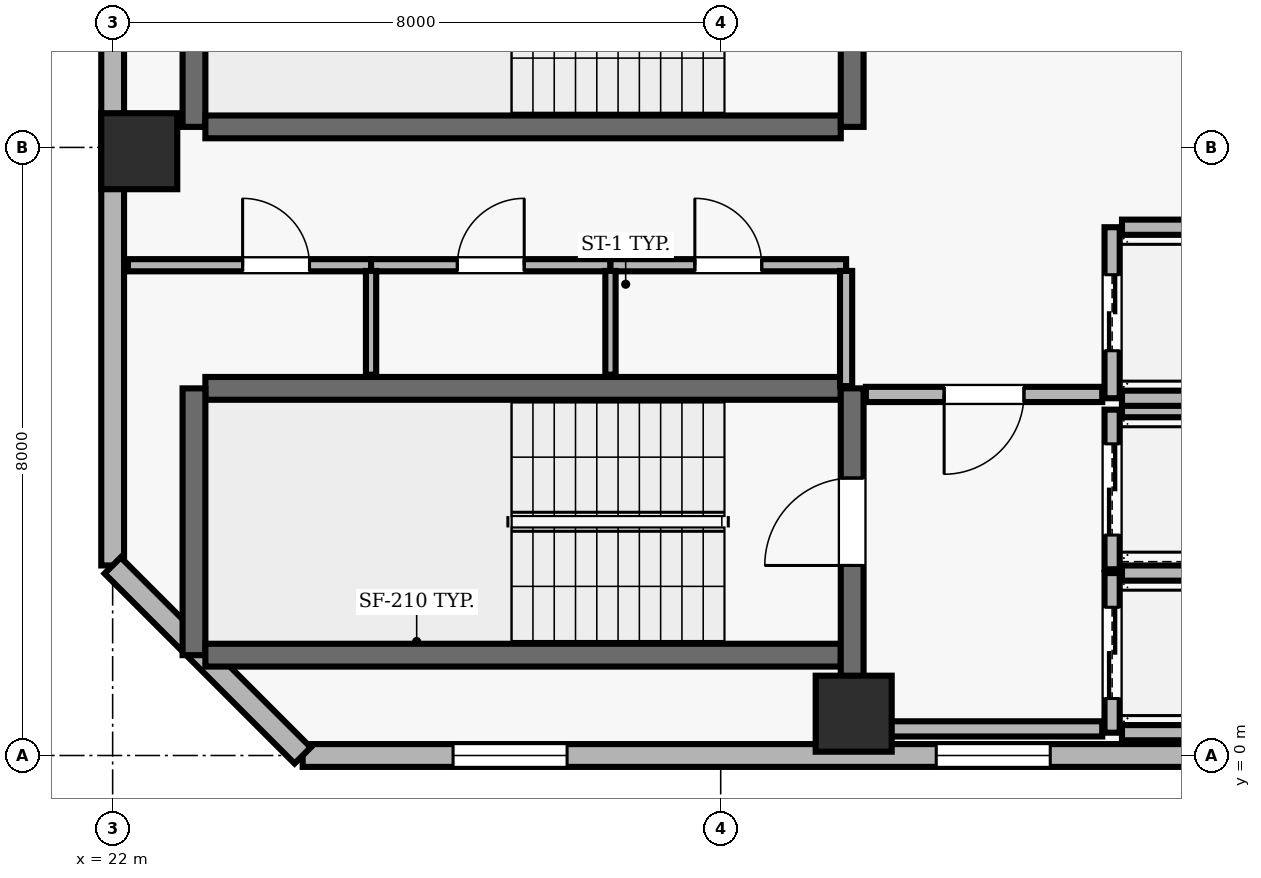
"""IFC4 building model, lengths in metres.
Left out: names, types, materials, properties, quantities, classifications, styles, units other than length and angle.
Written with IfcOpenShell. Run it as: python <this file> out.ifc"""

import sys

from ifc_helpers import new_model, si_unit, direction, frame, frame_2d, origin, origin_2d, place, context, subcontext, project, spatial, rectangle, extrude, element, fill, save


model = new_model("IFC4")
c1 = context("Model", 3, precision=1e-05, world=origin(), true_north=direction((0.0, 1.0)))
c2 = subcontext(c1, "Body", "Model", "MODEL_VIEW")
j1 = project(units=[si_unit("LENGTHUNIT", "METRE"), si_unit("PLANEANGLEUNIT", "RADIAN")], contexts=[c1])
p1 = place(None, origin())
s1 = spatial("IfcSite", under=j1, at=p1, CompositionType="ELEMENT")
p2 = place(p1, origin())
s2 = spatial("IfcBuilding", under=s1, at=p2, CompositionType="ELEMENT")
p3 = place(p2, frame((0.0, 0.0, 218.7)))
s3 = spatial("IfcBuildingStorey", under=s2, at=p3, CompositionType="ELEMENT", Elevation=218.7)
for number, where, z_axis, x_axis in (
    (1, (31.75, 0.55, 0.0), (0.0, 0.0, 1.0), (1.0, 0.0, 0.0)),
    (2, (22.35, 7.95, 0.0), (0.0, 0.0, 1.0), (1.0, 0.0, 0.0)),
):
    element("IfcColumn", number, at=place(p3, frame(where, z_axis=z_axis, x_axis=x_axis)), inside=s3, PredefinedType="COLUMN", context=c2, shape_type="SweptSolid", body=[
        extrude(rectangle(XDim=1.0, YDim=1.0, at=origin_2d()), origin(), (0.0, 0.0, 1.0), 3.9),
    ])
p4 = place(p3, frame((24.5, 0.0, 0.0), z_axis=(0.0, 0.0, 1.0), x_axis=(1.0, 0.0, 0.0)))
e3 = element("IfcWall", 3, at=p4, inside=s3, PredefinedType="SOLIDWALL", context=c2, shape_type="SweptSolid", body=[
    extrude(rectangle(XDim=38.2, YDim=0.3, at=frame_2d((19.1, 0.0))), origin(), (0.0, 0.0, 1.0), 3.69),
])
p5 = place(p4, frame((1.979, 0.0, 0.9)))
e4 = element("IfcOpeningElement", 4, at=p5, cuts=e3, PredefinedType="OPENING", context=c2, shape_type="SweptSolid", body=[
    extrude(rectangle(XDim=1.5, YDim=1.8, at=frame_2d((0.75, 0.9))), frame((0.0, 0.16, 0.0), z_axis=(0.0, -1.0, 0.0), x_axis=(1.0, 0.0, 0.0)), (0.0, 0.0, 1.0), 0.32),
])
p6 = place(p4, frame((8.336, 0.0, 0.9)))
e5 = element("IfcOpeningElement", 5, at=p6, cuts=e3, PredefinedType="OPENING", context=c2, shape_type="SweptSolid", body=[
    extrude(rectangle(XDim=1.5, YDim=1.8, at=frame_2d((0.75, 0.9))), frame((0.0, 0.16, 0.0), z_axis=(0.0, -1.0, 0.0), x_axis=(1.0, 0.0, 0.0)), (0.0, 0.0, 1.0), 0.32),
])
p7 = place(p4, frame((18.35, 0.0, 0.9)))
e6 = element("IfcOpeningElement", 6, at=p7, cuts=e3, PredefinedType="OPENING", context=c2, shape_type="SweptSolid", body=[
    extrude(rectangle(XDim=1.5, YDim=1.8, at=frame_2d((0.75, 0.9))), frame((0.0, 0.16, 0.0), z_axis=(0.0, -1.0, 0.0), x_axis=(1.0, 0.0, 0.0)), (0.0, 0.0, 1.0), 0.32),
])
p8 = place(p4, frame((29.264, 0.0, 0.9)))
e7 = element("IfcOpeningElement", 7, at=p8, cuts=e3, PredefinedType="OPENING", context=c2, shape_type="SweptSolid", body=[
    extrude(rectangle(XDim=1.5, YDim=1.8, at=frame_2d((0.75, 0.9))), frame((0.0, 0.16, 0.0), z_axis=(0.0, -1.0, 0.0), x_axis=(1.0, 0.0, 0.0)), (0.0, 0.0, 1.0), 0.32),
])
p9 = place(p4, frame((34.721, 0.0, 0.9)))
e8 = element("IfcOpeningElement", 8, at=p9, cuts=e3, PredefinedType="OPENING", context=c2, shape_type="SweptSolid", body=[
    extrude(rectangle(XDim=1.5, YDim=1.8, at=frame_2d((0.75, 0.9))), frame((0.0, 0.16, 0.0), z_axis=(0.0, -1.0, 0.0), x_axis=(1.0, 0.0, 0.0)), (0.0, 0.0, 1.0), 0.32),
])
p10 = place(p3, frame((22.0, 40.7, 0.0), z_axis=(0.0, 0.0, 1.0), x_axis=(0.0, -1.0, 0.0)))
e9 = element("IfcWall", 9, at=p10, inside=s3, PredefinedType="SOLIDWALL", context=c2, shape_type="SweptSolid", body=[
    extrude(rectangle(XDim=38.2, YDim=0.3, at=frame_2d((19.1, 0.0))), origin(), (0.0, 0.0, 1.0), 3.69),
])
p11 = place(p10, frame((7.8, 0.0, 0.0)))
e10 = element("IfcOpeningElement", 10, at=p11, cuts=e9, PredefinedType="OPENING", context=c2, shape_type="SweptSolid", body=[
    extrude(rectangle(XDim=1.0, YDim=2.2, at=frame_2d((0.5, 1.1))), frame((0.0, 0.16, 0.0), z_axis=(0.0, -1.0, 0.0), x_axis=(1.0, 0.0, 0.0)), (0.0, 0.0, 1.0), 0.32),
])
p12 = place(p10, frame((1.979, 0.0, 0.9)))
e11 = element("IfcOpeningElement", 11, at=p12, cuts=e9, PredefinedType="OPENING", context=c2, shape_type="SweptSolid", body=[
    extrude(rectangle(XDim=1.5, YDim=1.8, at=frame_2d((0.75, 0.9))), frame((0.0, 0.16, 0.0), z_axis=(0.0, -1.0, 0.0), x_axis=(1.0, 0.0, 0.0)), (0.0, 0.0, 1.0), 0.32),
])
p13 = place(p10, frame((12.443, 0.0, 0.9)))
e12 = element("IfcOpeningElement", 12, at=p13, cuts=e9, PredefinedType="OPENING", context=c2, shape_type="SweptSolid", body=[
    extrude(rectangle(XDim=1.5, YDim=1.8, at=frame_2d((0.75, 0.9))), frame((0.0, 0.16, 0.0), z_axis=(0.0, -1.0, 0.0), x_axis=(1.0, 0.0, 0.0)), (0.0, 0.0, 1.0), 0.32),
])
p14 = place(p10, frame((18.35, 0.0, 0.9)))
e13 = element("IfcOpeningElement", 13, at=p14, cuts=e9, PredefinedType="OPENING", context=c2, shape_type="SweptSolid", body=[
    extrude(rectangle(XDim=1.5, YDim=1.8, at=frame_2d((0.75, 0.9))), frame((0.0, 0.16, 0.0), z_axis=(0.0, -1.0, 0.0), x_axis=(1.0, 0.0, 0.0)), (0.0, 0.0, 1.0), 0.32),
])
p15 = place(p10, frame((23.807, 0.0, 0.9)))
e14 = element("IfcOpeningElement", 14, at=p15, cuts=e9, PredefinedType="OPENING", context=c2, shape_type="SweptSolid", body=[
    extrude(rectangle(XDim=1.5, YDim=1.8, at=frame_2d((0.75, 0.9))), frame((0.0, 0.16, 0.0), z_axis=(0.0, -1.0, 0.0), x_axis=(1.0, 0.0, 0.0)), (0.0, 0.0, 1.0), 0.32),
])
p16 = place(p10, frame((29.264, 0.0, 0.9)))
e15 = element("IfcOpeningElement", 15, at=p16, cuts=e9, PredefinedType="OPENING", context=c2, shape_type="SweptSolid", body=[
    extrude(rectangle(XDim=1.5, YDim=1.8, at=frame_2d((0.75, 0.9))), frame((0.0, 0.16, 0.0), z_axis=(0.0, -1.0, 0.0), x_axis=(1.0, 0.0, 0.0)), (0.0, 0.0, 1.0), 0.32),
])
p17 = place(p3, frame((22.0, 2.5, 0.0), z_axis=(0.0, 0.0, 1.0), x_axis=(0.707106781187, -0.707106781187, 0.0)))
e16 = element("IfcWall", 16, at=p17, inside=s3, PredefinedType="SOLIDWALL", context=c2, shape_type="SweptSolid", body=[
    extrude(rectangle(XDim=3.536, YDim=0.3, at=frame_2d((1.768, 0.0))), origin(), (0.0, 0.0, 1.0), 3.69),
])
p18 = place(p3, frame((31.58, 4.83, 0.0), z_axis=(0.0, 0.0, 1.0), x_axis=(-1.0, 0.0, 0.0)))
e17 = element("IfcWall", 17, at=p18, inside=s3, PredefinedType="SHEAR", context=c2, shape_type="SweptSolid", body=[
    extrude(rectangle(XDim=8.36, YDim=0.3, at=frame_2d((4.18, 0.0))), origin(), (0.0, 0.0, 1.0), 3.69),
])
p19 = place(p3, frame((23.07, 4.83, 0.0), z_axis=(0.0, 0.0, 1.0), x_axis=(0.0, -1.0, 0.0)))
e18 = element("IfcWall", 18, at=p19, inside=s3, PredefinedType="SHEAR", context=c2, shape_type="SweptSolid", body=[
    extrude(rectangle(XDim=3.51, YDim=0.3, at=frame_2d((1.755, 0.0))), origin(), (0.0, 0.0, 1.0), 3.69),
])
p20 = place(p3, frame((23.22, 1.32, 0.0), z_axis=(0.0, 0.0, 1.0), x_axis=(1.0, 0.0, 0.0)))
e19 = element("IfcWall", 19, at=p20, inside=s3, PredefinedType="SHEAR", context=c2, shape_type="SweptSolid", body=[
    extrude(rectangle(XDim=8.36, YDim=0.3, at=frame_2d((4.18, 0.0))), origin(), (0.0, 0.0, 1.0), 3.69),
])
p21 = place(p3, frame((31.73, 0.96, 0.0), z_axis=(0.0, 0.0, 1.0), x_axis=(0.0, 1.0, 0.0)))
e20 = element("IfcWall", 20, at=p21, inside=s3, PredefinedType="SHEAR", context=c2, shape_type="SweptSolid", body=[
    extrude(rectangle(XDim=3.87, YDim=0.3, at=frame_2d((1.935, 0.0))), origin(), (0.0, 0.0, 1.0), 3.69),
])
p22 = place(p21, frame((1.54, 0.0, 0.0)))
e21 = element("IfcOpeningElement", 21, at=p22, cuts=e20, PredefinedType="OPENING", context=c2, shape_type="SweptSolid", body=[
    extrude(rectangle(XDim=1.15, YDim=2.15, at=frame_2d((0.575, 1.075))), frame((0.0, 0.16, 0.0), z_axis=(0.0, -1.0, 0.0), x_axis=(1.0, 0.0, 0.0)), (0.0, 0.0, 1.0), 0.32),
])
p23 = place(p3, frame((23.07, 11.78, 0.0), z_axis=(0.0, 0.0, 1.0), x_axis=(0.0, -1.0, 0.0)))
e22 = element("IfcWall", 22, at=p23, inside=s3, PredefinedType="SHEAR", context=c2, shape_type="SweptSolid", body=[
    extrude(rectangle(XDim=3.51, YDim=0.3, at=frame_2d((1.755, 0.0))), origin(), (0.0, 0.0, 1.0), 3.69),
])
p24 = place(p3, frame((23.22, 8.27, 0.0), z_axis=(0.0, 0.0, 1.0), x_axis=(1.0, 0.0, 0.0)))
e23 = element("IfcWall", 23, at=p24, inside=s3, PredefinedType="SHEAR", context=c2, shape_type="SweptSolid", body=[
    extrude(rectangle(XDim=8.36, YDim=0.3, at=frame_2d((4.18, 0.0))), origin(), (0.0, 0.0, 1.0), 3.69),
])
p25 = place(p3, frame((31.73, 8.27, 0.0), z_axis=(0.0, 0.0, 1.0), x_axis=(0.0, 1.0, 0.0)))
e24 = element("IfcWall", 24, at=p25, inside=s3, PredefinedType="SHEAR", context=c2, shape_type="SweptSolid", body=[
    extrude(rectangle(XDim=3.51, YDim=0.3, at=frame_2d((1.755, 0.0))), origin(), (0.0, 0.0, 1.0), 3.69),
])
p26 = place(p25, frame((1.18, 0.0, 0.0)))
e25 = element("IfcOpeningElement", 25, at=p26, cuts=e24, PredefinedType="OPENING", context=c2, shape_type="SweptSolid", body=[
    extrude(rectangle(XDim=1.15, YDim=2.15, at=frame_2d((0.575, 1.075))), frame((0.0, 0.16, 0.0), z_axis=(0.0, -1.0, 0.0), x_axis=(1.0, 0.0, 0.0)), (0.0, 0.0, 1.0), 0.32),
])
p27 = place(p3, frame((35.15, 2.4, 0.0), z_axis=(0.0, 0.0, 1.0), x_axis=(0.0, -1.0, 0.0)))
e26 = element("IfcWall", 26, at=p27, inside=s3, PredefinedType="SOLIDWALL", context=c2, shape_type="SweptSolid", body=[
    extrude(rectangle(XDim=2.1, YDim=0.2, at=frame_2d((1.05, 0.0))), origin(), (0.0, 0.0, 1.0), 3.69),
])
p28 = place(p27, frame((0.45, 0.0, 0.0)))
e27 = element("IfcOpeningElement", 27, at=p28, cuts=e26, PredefinedType="OPENING", context=c2, shape_type="SweptSolid", body=[
    extrude(rectangle(XDim=1.2, YDim=2.15, at=frame_2d((0.6, 1.075))), frame((0.0, 0.11, 0.0), z_axis=(0.0, -1.0, 0.0), x_axis=(1.0, 0.0, 0.0)), (0.0, 0.0, 1.0), 0.22),
])
for number, where, z_axis, x_axis in (
    (28, (35.28, 0.3, 0.0), (0.0, 0.0, 1.0), (1.0, 0.0, 0.0)),
    (29, (37.42, 2.4, 0.0), (0.0, 0.0, 1.0), (-1.0, 0.0, 0.0)),
):
    element("IfcWall", number, at=place(p3, frame(where, z_axis=z_axis, x_axis=x_axis)), inside=s3, PredefinedType="SOLIDWALL", context=c2, shape_type="SweptSolid", body=[
        extrude(rectangle(XDim=2.14, YDim=0.2, at=frame_2d((1.07, 0.0))), origin(), (0.0, 0.0, 1.0), 3.69),
    ])
p29 = place(p3, frame((35.15, 4.55, 0.0), z_axis=(0.0, 0.0, 1.0), x_axis=(0.0, -1.0, 0.0)))
e30 = element("IfcWall", 30, at=p29, inside=s3, PredefinedType="SOLIDWALL", context=c2, shape_type="SweptSolid", body=[
    extrude(rectangle(XDim=2.1, YDim=0.2, at=frame_2d((1.05, 0.0))), origin(), (0.0, 0.0, 1.0), 3.69),
])
p30 = place(p29, frame((0.45, 0.0, 0.0)))
e31 = element("IfcOpeningElement", 31, at=p30, cuts=e30, PredefinedType="OPENING", context=c2, shape_type="SweptSolid", body=[
    extrude(rectangle(XDim=1.2, YDim=2.15, at=frame_2d((0.6, 1.075))), frame((0.0, 0.11, 0.0), z_axis=(0.0, -1.0, 0.0), x_axis=(1.0, 0.0, 0.0)), (0.0, 0.0, 1.0), 0.22),
])
p31 = place(p3, frame((37.42, 4.55, 0.0), z_axis=(0.0, 0.0, 1.0), x_axis=(-1.0, 0.0, 0.0)))
e32 = element("IfcWall", 32, at=p31, inside=s3, PredefinedType="SOLIDWALL", context=c2, shape_type="SweptSolid", body=[
    extrude(rectangle(XDim=2.14, YDim=0.2, at=frame_2d((1.07, 0.0))), origin(), (0.0, 0.0, 1.0), 3.69),
])
p32 = place(p3, frame((35.15, 6.95, 0.0), z_axis=(0.0, 0.0, 1.0), x_axis=(0.0, -1.0, 0.0)))
e33 = element("IfcWall", 33, at=p32, inside=s3, PredefinedType="SOLIDWALL", context=c2, shape_type="SweptSolid", body=[
    extrude(rectangle(XDim=2.25, YDim=0.2, at=frame_2d((1.125, 0.0))), origin(), (0.0, 0.0, 1.0), 3.69),
])
p33 = place(p32, frame((0.625, 0.0, 0.0)))
e34 = element("IfcOpeningElement", 34, at=p33, cuts=e33, PredefinedType="OPENING", context=c2, shape_type="SweptSolid", body=[
    extrude(rectangle(XDim=1.0, YDim=2.1, at=frame_2d((0.5, 1.05))), frame((0.0, 0.11, 0.0), z_axis=(0.0, -1.0, 0.0), x_axis=(1.0, 0.0, 0.0)), (0.0, 0.0, 1.0), 0.22),
])
for number, where, z_axis, x_axis in (
    (35, (35.28, 4.7, 0.0), (0.0, 0.0, 1.0), (1.0, 0.0, 0.0)),
    (36, (37.42, 6.95, 0.0), (0.0, 0.0, 1.0), (-1.0, 0.0, 0.0)),
):
    element("IfcWall", number, at=place(p3, frame(where, z_axis=z_axis, x_axis=x_axis)), inside=s3, PredefinedType="SOLIDWALL", context=c2, shape_type="SweptSolid", body=[
        extrude(rectangle(XDim=2.14, YDim=0.2, at=frame_2d((1.07, 0.0))), origin(), (0.0, 0.0, 1.0), 3.69),
    ])
p34 = place(p3, frame((22.2, 6.45, 0.0), z_axis=(0.0, 0.0, 1.0), x_axis=(1.0, 0.0, 0.0)))
e37 = element("IfcWall", 37, at=p34, inside=s3, PredefinedType="PARTITIONING", context=c2, shape_type="SweptSolid", body=[
    extrude(rectangle(XDim=3.2, YDim=0.16, at=frame_2d((1.6, 0.0))), origin(), (0.0, 0.0, 1.0), 3.69),
])
p35 = place(p34, frame((1.51, 0.0, 0.0)))
e38 = element("IfcOpeningElement", 38, at=p35, cuts=e37, PredefinedType="OPENING", context=c2, shape_type="SweptSolid", body=[
    extrude(rectangle(XDim=0.88, YDim=2.1, at=frame_2d((0.44, 1.05))), frame((0.0, 0.09, 0.0), z_axis=(0.0, -1.0, 0.0), x_axis=(1.0, 0.0, 0.0)), (0.0, 0.0, 1.0), 0.18),
])
p36 = place(p3, frame((25.4, 6.45, 0.0), z_axis=(0.0, 0.0, 1.0), x_axis=(1.0, 0.0, 0.0)))
e39 = element("IfcWall", 39, at=p36, inside=s3, PredefinedType="PARTITIONING", context=c2, shape_type="SweptSolid", body=[
    extrude(rectangle(XDim=3.15, YDim=0.16, at=frame_2d((1.575, 0.0))), origin(), (0.0, 0.0, 1.0), 3.69),
])
p37 = place(p36, frame((1.135, 0.0, 0.0)))
e40 = element("IfcOpeningElement", 40, at=p37, cuts=e39, PredefinedType="OPENING", context=c2, shape_type="SweptSolid", body=[
    extrude(rectangle(XDim=0.88, YDim=2.1, at=frame_2d((0.44, 1.05))), frame((0.0, 0.09, 0.0), z_axis=(0.0, -1.0, 0.0), x_axis=(1.0, 0.0, 0.0)), (0.0, 0.0, 1.0), 0.18),
])
p38 = place(p3, frame((28.55, 6.45, 0.0), z_axis=(0.0, 0.0, 1.0), x_axis=(1.0, 0.0, 0.0)))
e41 = element("IfcWall", 41, at=p38, inside=s3, PredefinedType="PARTITIONING", context=c2, shape_type="SweptSolid", body=[
    extrude(rectangle(XDim=3.1, YDim=0.16, at=frame_2d((1.55, 0.0))), origin(), (0.0, 0.0, 1.0), 3.69),
])
p39 = place(p38, frame((1.11, 0.0, 0.0)))
e42 = element("IfcOpeningElement", 42, at=p39, cuts=e41, PredefinedType="OPENING", context=c2, shape_type="SweptSolid", body=[
    extrude(rectangle(XDim=0.88, YDim=2.1, at=frame_2d((0.44, 1.05))), frame((0.0, 0.09, 0.0), z_axis=(0.0, -1.0, 0.0), x_axis=(1.0, 0.0, 0.0)), (0.0, 0.0, 1.0), 0.18),
])
p40 = place(p3, frame((31.65, 0.35, 0.0), z_axis=(0.0, 0.0, 1.0), x_axis=(1.0, 0.0, 0.0)))
e43 = element("IfcWall", 43, at=p40, inside=s3, PredefinedType="SOLIDWALL", context=c2, shape_type="SweptSolid", body=[
    extrude(rectangle(XDim=3.37, YDim=0.2, at=frame_2d((1.685, 0.0))), origin(), (0.0, 0.0, 1.0), 3.69),
])
p41 = place(p3, frame((35.02, 4.75, 0.0), z_axis=(0.0, 0.0, 1.0), x_axis=(-1.0, 0.0, 0.0)))
e44 = element("IfcWall", 44, at=p41, inside=s3, PredefinedType="SOLIDWALL", context=c2, shape_type="SweptSolid", body=[
    extrude(rectangle(XDim=3.11, YDim=0.2, at=frame_2d((1.555, 0.0))), origin(), (0.0, 0.0, 1.0), 3.69),
])
p42 = place(p41, frame((1.03, 0.0, 0.0)))
e45 = element("IfcOpeningElement", 45, at=p42, cuts=e44, PredefinedType="OPENING", context=c2, shape_type="SweptSolid", body=[
    extrude(rectangle(XDim=1.05, YDim=2.15, at=frame_2d((0.525, 1.075))), frame((0.0, 0.11, 0.0), z_axis=(0.0, -1.0, 0.0), x_axis=(1.0, 0.0, 0.0)), (0.0, 0.0, 1.0), 0.22),
])
for number, where, z_axis, x_axis in (
    (46, (25.4, 5.01, 0.0), (0.0, 0.0, 1.0), (0.0, 1.0, 0.0)),
    (47, (28.55, 5.01, 0.0), (0.0, 0.0, 1.0), (0.0, 1.0, 0.0)),
):
    element("IfcWall", number, at=place(p3, frame(where, z_axis=z_axis, x_axis=x_axis)), inside=s3, PredefinedType="PARTITIONING", context=c2, shape_type="SweptSolid", body=[
        extrude(rectangle(XDim=1.365, YDim=0.135, at=frame_2d((0.683, 0.0))), origin(), (0.0, 0.0, 1.0), 3.69),
    ])
p43 = place(p3, frame((31.65, 4.86, 0.0), z_axis=(0.0, 0.0, 1.0), x_axis=(0.0, 1.0, 0.0)))
e48 = element("IfcWall", 48, at=p43, inside=s3, PredefinedType="PARTITIONING", context=c2, shape_type="SweptSolid", body=[
    extrude(rectangle(XDim=1.515, YDim=0.16, at=frame_2d((0.757, 0.0))), origin(), (0.0, 0.0, 1.0), 3.69),
])
p44 = place(p5, origin())
e49 = element("IfcWindow", 49, at=p44, inside=s3, PartitioningType="SINGLE_PANEL", PredefinedType="WINDOW", context=c2, shape_type="SweptSolid", body=[
    extrude(rectangle(XDim=1.5, YDim=1.8, at=frame_2d((0.75, 0.9))), frame((0.0, 0.03, 0.0), z_axis=(0.0, -1.0, 0.0), x_axis=(1.0, 0.0, 0.0)), (0.0, 0.0, 1.0), 0.06),
])
fill(e4, e49)
p45 = place(p6, origin())
e50 = element("IfcWindow", 50, at=p45, inside=s3, PartitioningType="SINGLE_PANEL", PredefinedType="WINDOW", context=c2, shape_type="SweptSolid", body=[
    extrude(rectangle(XDim=1.5, YDim=1.8, at=frame_2d((0.75, 0.9))), frame((0.0, 0.03, 0.0), z_axis=(0.0, -1.0, 0.0), x_axis=(1.0, 0.0, 0.0)), (0.0, 0.0, 1.0), 0.06),
])
fill(e5, e50)
p46 = place(p22, origin())
e51 = element("IfcDoor", 51, at=p46, inside=s3, OperationType="SINGLE_SWING_LEFT", PredefinedType="DOOR", context=c2, shape_type="SweptSolid", body=[
    extrude(rectangle(XDim=1.15, YDim=2.15, at=frame_2d((0.575, 1.075))), frame((0.0, 0.025, 0.0), z_axis=(0.0, -1.0, 0.0), x_axis=(1.0, 0.0, 0.0)), (0.0, 0.0, 1.0), 0.05),
])
fill(e21, e51)
p47 = place(p28, origin())
e52 = element("IfcDoor", 52, at=p47, inside=s3, OperationType="DOUBLE_DOOR_SLIDING", PredefinedType="DOOR", context=c2, shape_type="SweptSolid", body=[
    extrude(rectangle(XDim=1.2, YDim=2.15, at=frame_2d((0.6, 1.075))), frame((0.0, 0.025, 0.0), z_axis=(0.0, -1.0, 0.0), x_axis=(1.0, 0.0, 0.0)), (0.0, 0.0, 1.0), 0.05),
])
fill(e27, e52)
p48 = place(p30, origin())
e53 = element("IfcDoor", 53, at=p48, inside=s3, OperationType="DOUBLE_DOOR_SLIDING", PredefinedType="DOOR", context=c2, shape_type="SweptSolid", body=[
    extrude(rectangle(XDim=1.2, YDim=2.15, at=frame_2d((0.6, 1.075))), frame((0.0, 0.025, 0.0), z_axis=(0.0, -1.0, 0.0), x_axis=(1.0, 0.0, 0.0)), (0.0, 0.0, 1.0), 0.05),
])
fill(e31, e53)
p49 = place(p33, origin())
e54 = element("IfcDoor", 54, at=p49, inside=s3, OperationType="DOUBLE_DOOR_SLIDING", PredefinedType="DOOR", context=c2, shape_type="SweptSolid", body=[
    extrude(rectangle(XDim=1.0, YDim=2.1, at=frame_2d((0.5, 1.05))), frame((0.0, 0.025, 0.0), z_axis=(0.0, -1.0, 0.0), x_axis=(1.0, 0.0, 0.0)), (0.0, 0.0, 1.0), 0.05),
])
fill(e34, e54)
p50 = place(p42, origin())
e55 = element("IfcDoor", 55, at=p50, inside=s3, OperationType="SINGLE_SWING_RIGHT", PredefinedType="DOOR", context=c2, shape_type="SweptSolid", body=[
    extrude(rectangle(XDim=1.05, YDim=2.15, at=frame_2d((0.525, 1.075))), frame((0.0, 0.025, 0.0), z_axis=(0.0, -1.0, 0.0), x_axis=(1.0, 0.0, 0.0)), (0.0, 0.0, 1.0), 0.05),
])
fill(e45, e55)
p51 = place(p35, origin())
e56 = element("IfcDoor", 56, at=p51, inside=s3, OperationType="SINGLE_SWING_LEFT", PredefinedType="DOOR", context=c2, shape_type="SweptSolid", body=[
    extrude(rectangle(XDim=0.88, YDim=2.1, at=frame_2d((0.44, 1.05))), frame((0.0, 0.025, 0.0), z_axis=(0.0, -1.0, 0.0), x_axis=(1.0, 0.0, 0.0)), (0.0, 0.0, 1.0), 0.05),
])
fill(e38, e56)
p52 = place(p37, origin())
e57 = element("IfcDoor", 57, at=p52, inside=s3, OperationType="SINGLE_SWING_RIGHT", PredefinedType="DOOR", context=c2, shape_type="SweptSolid", body=[
    extrude(rectangle(XDim=0.88, YDim=2.1, at=frame_2d((0.44, 1.05))), frame((0.0, 0.025, 0.0), z_axis=(0.0, -1.0, 0.0), x_axis=(1.0, 0.0, 0.0)), (0.0, 0.0, 1.0), 0.05),
])
fill(e40, e57)
p53 = place(p39, origin())
e58 = element("IfcDoor", 58, at=p53, inside=s3, OperationType="SINGLE_SWING_LEFT", PredefinedType="DOOR", context=c2, shape_type="SweptSolid", body=[
    extrude(rectangle(XDim=0.88, YDim=2.1, at=frame_2d((0.44, 1.05))), frame((0.0, 0.025, 0.0), z_axis=(0.0, -1.0, 0.0), x_axis=(1.0, 0.0, 0.0)), (0.0, 0.0, 1.0), 0.05),
])
fill(e42, e58)
save(model, sys.argv[1])
